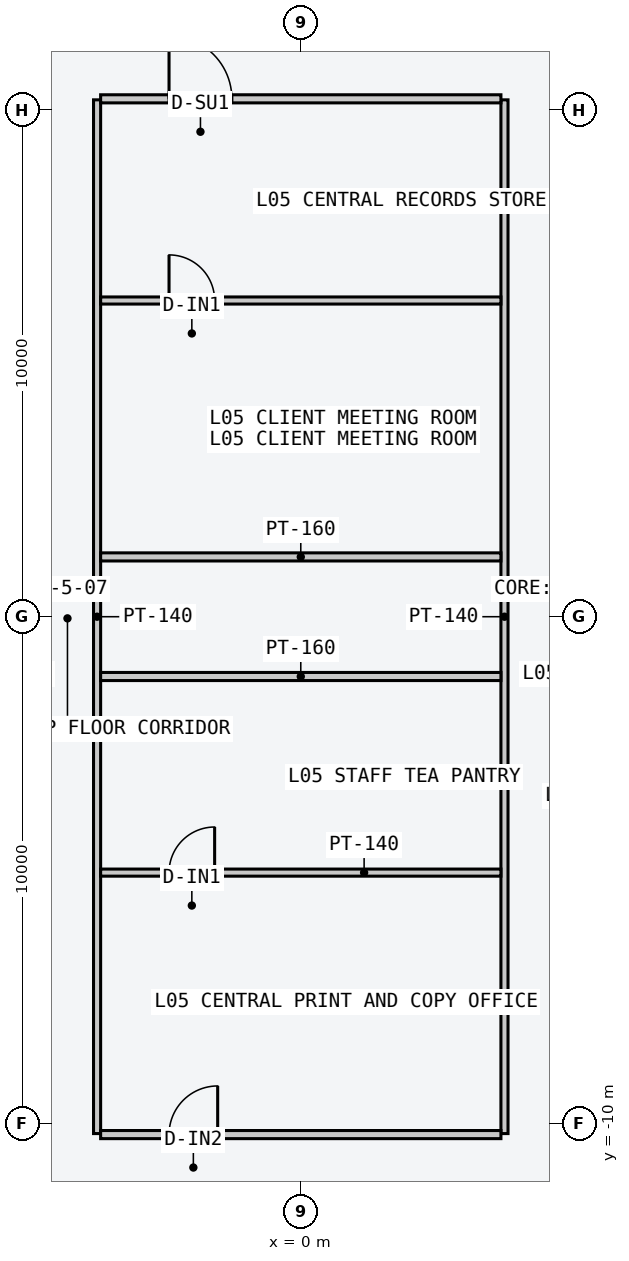
"""IFC4 building model, lengths in metres.
Left out: names, types, materials, properties, quantities, classifications, styles, units other than length and angle.
Written with IfcOpenShell. Run it as: python <this file> out.ifc"""

import sys

from ifc_helpers import new_model, si_unit, direction, frame, frame_2d, origin, place, context, subcontext, project, spatial, rectangle, extrude, element, fill, save


model = new_model("IFC4")
c1 = context("Model", 3, precision=1e-05, world=origin(), true_north=direction((0.0, 1.0)))
c2 = subcontext(c1, "Body", "Model", "MODEL_VIEW")
j1 = project(units=[si_unit("LENGTHUNIT", "METRE"), si_unit("PLANEANGLEUNIT", "RADIAN")], contexts=[c1])
p1 = place(None, origin())
s1 = spatial("IfcSite", under=j1, at=p1, CompositionType="ELEMENT")
p2 = place(p1, origin())
s2 = spatial("IfcBuilding", under=s1, at=p2, CompositionType="ELEMENT")
p3 = place(p2, frame((0.0, 0.0, 24.0)))
s3 = spatial("IfcBuildingStorey", under=s2, at=p3, CompositionType="ELEMENT", Elevation=24.0)
p4 = place(p3, frame((-4.02, -10.2, 0.0), z_axis=(0.0, 0.0, 1.0), x_axis=(0.0, 1.0, 0.0)))
e1 = element("IfcWall", 1, at=p4, inside=s3, PredefinedType="PARTITIONING", context=c2, shape_type="SweptSolid", body=[
    extrude(rectangle(XDim=20.4, YDim=0.14, at=frame_2d((10.2, 0.0))), origin(), (0.0, 0.0, 1.0), 1.74),
])
p5 = place(p3, frame((4.02, -10.2, 0.0), z_axis=(0.0, 0.0, 1.0), x_axis=(0.0, 1.0, 0.0)))
e2 = element("IfcWall", 2, at=p5, inside=s3, PredefinedType="PARTITIONING", context=c2, shape_type="SweptSolid", body=[
    extrude(rectangle(XDim=20.4, YDim=0.14, at=frame_2d((10.2, 0.0))), origin(), (0.0, 0.0, 1.0), 3.4),
])
p6 = place(p3, frame((-3.95, 1.18, 0.0), z_axis=(0.0, 0.0, 1.0), x_axis=(1.0, 0.0, 0.0)))
e3 = element("IfcWall", 3, at=p6, inside=s3, PredefinedType="PARTITIONING", context=c2, shape_type="SweptSolid", body=[
    extrude(rectangle(XDim=7.9, YDim=0.16, at=frame_2d((3.95, 0.0))), origin(), (0.0, 0.0, 1.0), 3.4),
])
p7 = place(p3, frame((-3.95, 10.22, 0.0), z_axis=(0.0, 0.0, 1.0), x_axis=(1.0, 0.0, 0.0)))
e4 = element("IfcWall", 4, at=p7, inside=s3, PredefinedType="PARTITIONING", context=c2, shape_type="SweptSolid", body=[
    extrude(rectangle(XDim=7.9, YDim=0.16, at=frame_2d((3.95, 0.0))), origin(), (0.0, 0.0, 1.0), 3.4),
])
p8 = place(p7, frame((1.35, 0.0, 0.0)))
e5 = element("IfcOpeningElement", 5, at=p8, cuts=e4, PredefinedType="OPENING", context=c2, shape_type="SweptSolid", body=[
    extrude(rectangle(XDim=1.24, YDim=2.24, at=frame_2d((0.62, 1.12))), frame((0.0, 0.09, 0.0), z_axis=(0.0, -1.0, 0.0), x_axis=(1.0, 0.0, 0.0)), (0.0, 0.0, 1.0), 0.18),
])
p9 = place(p3, frame((-3.95, -1.18, 0.0), z_axis=(0.0, 0.0, 1.0), x_axis=(1.0, 0.0, 0.0)))
e6 = element("IfcWall", 6, at=p9, inside=s3, PredefinedType="PARTITIONING", context=c2, shape_type="SweptSolid", body=[
    extrude(rectangle(XDim=7.9, YDim=0.16, at=frame_2d((3.95, 0.0))), origin(), (0.0, 0.0, 1.0), 3.4),
])
p10 = place(p3, frame((-3.95, -10.22, 0.0), z_axis=(0.0, 0.0, 1.0), x_axis=(1.0, 0.0, 0.0)))
e7 = element("IfcWall", 7, at=p10, inside=s3, PredefinedType="PARTITIONING", context=c2, shape_type="SweptSolid", body=[
    extrude(rectangle(XDim=7.9, YDim=0.16, at=frame_2d((3.95, 0.0))), origin(), (0.0, 0.0, 1.0), 3.4),
])
p11 = place(p10, frame((1.35, 0.0, 0.0)))
e8 = element("IfcOpeningElement", 8, at=p11, cuts=e7, PredefinedType="OPENING", context=c2, shape_type="SweptSolid", body=[
    extrude(rectangle(XDim=0.96, YDim=2.18, at=frame_2d((0.48, 1.09))), frame((0.0, 0.09, 0.0), z_axis=(0.0, -1.0, 0.0), x_axis=(1.0, 0.0, 0.0)), (0.0, 0.0, 1.0), 0.18),
])
p12 = place(p3, frame((-3.95, 6.24, 0.0), z_axis=(0.0, 0.0, 1.0), x_axis=(1.0, 0.0, 0.0)))
e9 = element("IfcWall", 9, at=p12, inside=s3, PredefinedType="PARTITIONING", context=c2, shape_type="SweptSolid", body=[
    extrude(rectangle(XDim=7.9, YDim=0.14, at=frame_2d((3.95, 0.0))), origin(), (0.0, 0.0, 1.0), 3.4),
])
p13 = place(p12, frame((1.35, 0.0, 0.0)))
e10 = element("IfcOpeningElement", 10, at=p13, cuts=e9, PredefinedType="OPENING", context=c2, shape_type="SweptSolid", body=[
    extrude(rectangle(XDim=0.9, YDim=2.15, at=frame_2d((0.45, 1.075))), frame((0.0, 0.08, 0.0), z_axis=(0.0, -1.0, 0.0), x_axis=(1.0, 0.0, 0.0)), (0.0, 0.0, 1.0), 0.16),
])
p14 = place(p3, frame((-3.95, -5.05, 0.0), z_axis=(0.0, 0.0, 1.0), x_axis=(1.0, 0.0, 0.0)))
e11 = element("IfcWall", 11, at=p14, inside=s3, PredefinedType="PARTITIONING", context=c2, shape_type="SweptSolid", body=[
    extrude(rectangle(XDim=7.9, YDim=0.14, at=frame_2d((3.95, 0.0))), origin(), (0.0, 0.0, 1.0), 3.4),
])
p15 = place(p14, frame((1.35, 0.0, 0.0)))
e12 = element("IfcOpeningElement", 12, at=p15, cuts=e11, PredefinedType="OPENING", context=c2, shape_type="SweptSolid", body=[
    extrude(rectangle(XDim=0.9, YDim=2.15, at=frame_2d((0.45, 1.075))), frame((0.0, 0.08, 0.0), z_axis=(0.0, -1.0, 0.0), x_axis=(1.0, 0.0, 0.0)), (0.0, 0.0, 1.0), 0.16),
])
p16 = place(p8, origin())
e13 = element("IfcDoor", 13, at=p16, inside=s3, OperationType="SINGLE_SWING_LEFT", PredefinedType="DOOR", context=c2, shape_type="SweptSolid", body=[
    extrude(rectangle(XDim=1.24, YDim=2.24, at=frame_2d((0.62, 1.12))), frame((0.0, 0.025, 0.0), z_axis=(0.0, -1.0, 0.0), x_axis=(1.0, 0.0, 0.0)), (0.0, 0.0, 1.0), 0.05),
])
fill(e5, e13)
p17 = place(p11, origin())
e14 = element("IfcDoor", 14, at=p17, inside=s3, OperationType="SINGLE_SWING_RIGHT", PredefinedType="DOOR", context=c2, shape_type="SweptSolid", body=[
    extrude(rectangle(XDim=0.96, YDim=2.18, at=frame_2d((0.48, 1.09))), frame((0.0, 0.025, 0.0), z_axis=(0.0, -1.0, 0.0), x_axis=(1.0, 0.0, 0.0)), (0.0, 0.0, 1.0), 0.05),
])
fill(e8, e14)
p18 = place(p13, origin())
e15 = element("IfcDoor", 15, at=p18, inside=s3, OperationType="SINGLE_SWING_LEFT", PredefinedType="DOOR", context=c2, shape_type="SweptSolid", body=[
    extrude(rectangle(XDim=0.9, YDim=2.15, at=frame_2d((0.45, 1.075))), frame((0.0, 0.025, 0.0), z_axis=(0.0, -1.0, 0.0), x_axis=(1.0, 0.0, 0.0)), (0.0, 0.0, 1.0), 0.05),
])
fill(e10, e15)
p19 = place(p15, origin())
e16 = element("IfcDoor", 16, at=p19, inside=s3, OperationType="SINGLE_SWING_RIGHT", PredefinedType="DOOR", context=c2, shape_type="SweptSolid", body=[
    extrude(rectangle(XDim=0.9, YDim=2.15, at=frame_2d((0.45, 1.075))), frame((0.0, 0.025, 0.0), z_axis=(0.0, -1.0, 0.0), x_axis=(1.0, 0.0, 0.0)), (0.0, 0.0, 1.0), 0.05),
])
fill(e12, e16)
save(model, sys.argv[1])
